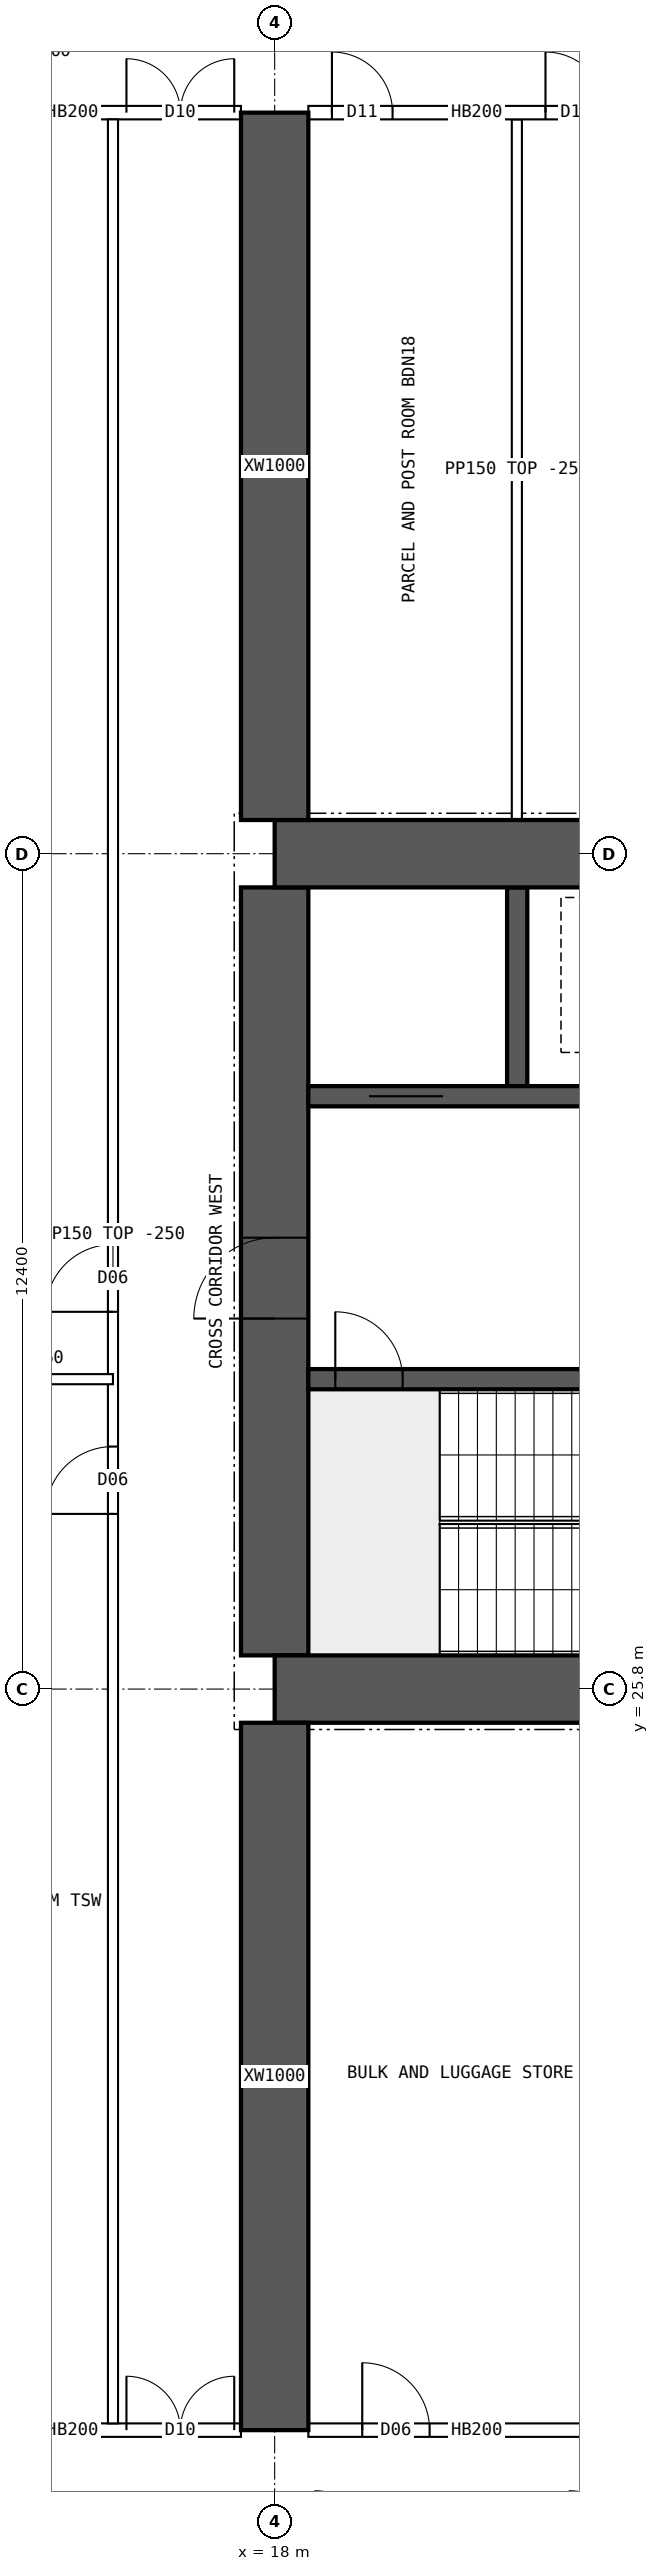
"""IFC4 building model, lengths in metres.
Left out: names, types, materials, properties, quantities, classifications, styles, units other than length and angle.
Written with IfcOpenShell. Run it as: python <this file> out.ifc"""

import sys

from ifc_helpers import new_model, si_unit, direction, frame, frame_2d, origin, place, context, subcontext, project, spatial, rectangle, extrude, element, fill, save


model = new_model("IFC4")
c1 = context("Model", 3, precision=1e-05, world=origin(), true_north=direction((0.0, 1.0)))
c2 = subcontext(c1, "Body", "Model", "MODEL_VIEW")
j1 = project(units=[si_unit("LENGTHUNIT", "METRE"), si_unit("PLANEANGLEUNIT", "RADIAN")], contexts=[c1])
p1 = place(None, origin())
s1 = spatial("IfcSite", under=j1, at=p1, CompositionType="ELEMENT")
p2 = place(p1, origin())
s2 = spatial("IfcBuilding", under=s1, at=p2, CompositionType="ELEMENT")
p3 = place(p2, frame((0.0, 0.0, 57.7)))
s3 = spatial("IfcBuildingStorey", under=s2, at=p3, CompositionType="ELEMENT", Elevation=57.7)
for number, where, z_axis, x_axis in (
    (1, (18.0, 25.8, 0.0), (0.0, 0.0, 1.0), (1.0, 0.0, 0.0)),
    (2, (18.0, 38.2, 0.0), (0.0, 0.0, 1.0), (1.0, 0.0, 0.0)),
):
    element("IfcWall", number, at=place(p3, frame(where, z_axis=z_axis, x_axis=x_axis)), inside=s3, PredefinedType="SHEAR", context=c2, shape_type="SweptSolid", body=[
        extrude(rectangle(XDim=48.0, YDim=1.0, at=frame_2d((24.0, 0.0))), origin(), (0.0, 0.0, 1.0), 3.75),
    ])
p4 = place(p3, frame((18.0, 26.3, 0.0), z_axis=(0.0, 0.0, 1.0), x_axis=(0.0, 1.0, 0.0)))
e3 = element("IfcWall", 3, at=p4, inside=s3, PredefinedType="SHEAR", context=c2, shape_type="SweptSolid", body=[
    extrude(rectangle(XDim=11.4, YDim=1.0, at=frame_2d((5.7, 0.0))), origin(), (0.0, 0.0, 1.0), 3.75),
])
p5 = place(p4, frame((5.0, 0.0, 0.0)))
e4 = element("IfcOpeningElement", 4, at=p5, cuts=e3, PredefinedType="OPENING", context=c2, shape_type="SweptSolid", body=[
    extrude(rectangle(XDim=1.2, YDim=2.1, at=frame_2d((0.6, 1.05))), frame((0.0, 0.51, 0.0), z_axis=(0.0, -1.0, 0.0), x_axis=(1.0, 0.0, 0.0)), (0.0, 0.0, 1.0), 1.02),
])
p6 = place(p3, frame((18.5, 30.4, 0.0), z_axis=(0.0, 0.0, 1.0), x_axis=(1.0, 0.0, 0.0)))
e5 = element("IfcWall", 5, at=p6, inside=s3, PredefinedType="SHEAR", context=c2, shape_type="SweptSolid", body=[
    extrude(rectangle(XDim=47.0, YDim=0.3, at=frame_2d((23.5, 0.0))), origin(), (0.0, 0.0, 1.0), 3.75),
])
p7 = place(p6, frame((0.4, 0.0, 0.0)))
e6 = element("IfcOpeningElement", 6, at=p7, cuts=e5, PredefinedType="OPENING", context=c2, shape_type="SweptSolid", body=[
    extrude(rectangle(XDim=1.0, YDim=2.1, at=frame_2d((0.5, 1.05))), frame((0.0, 0.16, 0.0), z_axis=(0.0, -1.0, 0.0), x_axis=(1.0, 0.0, 0.0)), (0.0, 0.0, 1.0), 0.32),
])
p8 = place(p6, frame((45.6, 0.0, 0.0)))
e7 = element("IfcOpeningElement", 7, at=p8, cuts=e5, PredefinedType="OPENING", context=c2, shape_type="SweptSolid", body=[
    extrude(rectangle(XDim=1.0, YDim=2.1, at=frame_2d((0.5, 1.05))), frame((0.0, 0.16, 0.0), z_axis=(0.0, -1.0, 0.0), x_axis=(1.0, 0.0, 0.0)), (0.0, 0.0, 1.0), 0.32),
])
p9 = place(p6, frame((8.25, 0.0, 0.0)))
e8 = element("IfcOpeningElement", 8, at=p9, cuts=e5, PredefinedType="OPENING", context=c2, shape_type="SweptSolid", body=[
    extrude(rectangle(XDim=1.1, YDim=2.1, at=frame_2d((0.55, 1.05))), frame((0.0, 0.16, 0.0), z_axis=(0.0, -1.0, 0.0), x_axis=(1.0, 0.0, 0.0)), (0.0, 0.0, 1.0), 0.32),
])
p10 = place(p6, frame((10.85, 0.0, 0.0)))
e9 = element("IfcOpeningElement", 9, at=p10, cuts=e5, PredefinedType="OPENING", context=c2, shape_type="SweptSolid", body=[
    extrude(rectangle(XDim=1.1, YDim=2.1, at=frame_2d((0.55, 1.05))), frame((0.0, 0.16, 0.0), z_axis=(0.0, -1.0, 0.0), x_axis=(1.0, 0.0, 0.0)), (0.0, 0.0, 1.0), 0.32),
])
p11 = place(p6, frame((13.45, 0.0, 0.0)))
e10 = element("IfcOpeningElement", 10, at=p11, cuts=e5, PredefinedType="OPENING", context=c2, shape_type="SweptSolid", body=[
    extrude(rectangle(XDim=1.1, YDim=2.1, at=frame_2d((0.55, 1.05))), frame((0.0, 0.16, 0.0), z_axis=(0.0, -1.0, 0.0), x_axis=(1.0, 0.0, 0.0)), (0.0, 0.0, 1.0), 0.32),
])
p12 = place(p6, frame((16.05, 0.0, 0.0)))
e11 = element("IfcOpeningElement", 11, at=p12, cuts=e5, PredefinedType="OPENING", context=c2, shape_type="SweptSolid", body=[
    extrude(rectangle(XDim=1.1, YDim=2.1, at=frame_2d((0.55, 1.05))), frame((0.0, 0.16, 0.0), z_axis=(0.0, -1.0, 0.0), x_axis=(1.0, 0.0, 0.0)), (0.0, 0.0, 1.0), 0.32),
])
p13 = place(p6, frame((30.117, 0.0, 0.0)))
e12 = element("IfcOpeningElement", 12, at=p13, cuts=e5, PredefinedType="OPENING", context=c2, shape_type="SweptSolid", body=[
    extrude(rectangle(XDim=1.1, YDim=2.1, at=frame_2d((0.55, 1.05))), frame((0.0, 0.16, 0.0), z_axis=(0.0, -1.0, 0.0), x_axis=(1.0, 0.0, 0.0)), (0.0, 0.0, 1.0), 0.32),
])
p14 = place(p6, frame((33.65, 0.0, 0.0)))
e13 = element("IfcOpeningElement", 13, at=p14, cuts=e5, PredefinedType="OPENING", context=c2, shape_type="SweptSolid", body=[
    extrude(rectangle(XDim=1.1, YDim=2.1, at=frame_2d((0.55, 1.05))), frame((0.0, 0.16, 0.0), z_axis=(0.0, -1.0, 0.0), x_axis=(1.0, 0.0, 0.0)), (0.0, 0.0, 1.0), 0.32),
])
p15 = place(p6, frame((37.183, 0.0, 0.0)))
e14 = element("IfcOpeningElement", 14, at=p15, cuts=e5, PredefinedType="OPENING", context=c2, shape_type="SweptSolid", body=[
    extrude(rectangle(XDim=1.1, YDim=2.1, at=frame_2d((0.55, 1.05))), frame((0.0, 0.16, 0.0), z_axis=(0.0, -1.0, 0.0), x_axis=(1.0, 0.0, 0.0)), (0.0, 0.0, 1.0), 0.32),
])
p16 = place(p3, frame((18.5, 34.6, 0.0), z_axis=(0.0, 0.0, 1.0), x_axis=(1.0, 0.0, 0.0)))
e15 = element("IfcWall", 15, at=p16, inside=s3, PredefinedType="SHEAR", context=c2, shape_type="SweptSolid", body=[
    extrude(rectangle(XDim=47.0, YDim=0.3, at=frame_2d((23.5, 0.0))), origin(), (0.0, 0.0, 1.0), 3.75),
])
p17 = place(p16, frame((0.9, 0.0, 0.0)))
e16 = element("IfcOpeningElement", 16, at=p17, cuts=e15, PredefinedType="OPENING", context=c2, shape_type="SweptSolid", body=[
    extrude(rectangle(XDim=1.1, YDim=2.1, at=frame_2d((0.55, 1.05))), frame((0.0, 0.16, 0.0), z_axis=(0.0, -1.0, 0.0), x_axis=(1.0, 0.0, 0.0)), (0.0, 0.0, 1.0), 0.32),
])
p18 = place(p16, frame((45.0, 0.0, 0.0)))
e17 = element("IfcOpeningElement", 17, at=p18, cuts=e15, PredefinedType="OPENING", context=c2, shape_type="SweptSolid", body=[
    extrude(rectangle(XDim=1.1, YDim=2.1, at=frame_2d((0.55, 1.05))), frame((0.0, 0.16, 0.0), z_axis=(0.0, -1.0, 0.0), x_axis=(1.0, 0.0, 0.0)), (0.0, 0.0, 1.0), 0.32),
])
p19 = place(p16, frame((4.1, 0.0, 0.0)))
e18 = element("IfcOpeningElement", 18, at=p19, cuts=e15, PredefinedType="OPENING", context=c2, shape_type="SweptSolid", body=[
    extrude(rectangle(XDim=0.9, YDim=2.1, at=frame_2d((0.45, 1.05))), frame((0.0, 0.16, 0.0), z_axis=(0.0, -1.0, 0.0), x_axis=(1.0, 0.0, 0.0)), (0.0, 0.0, 1.0), 0.32),
])
p20 = place(p16, frame((42.0, 0.0, 0.0)))
e19 = element("IfcOpeningElement", 19, at=p20, cuts=e15, PredefinedType="OPENING", context=c2, shape_type="SweptSolid", body=[
    extrude(rectangle(XDim=0.9, YDim=2.1, at=frame_2d((0.45, 1.05))), frame((0.0, 0.16, 0.0), z_axis=(0.0, -1.0, 0.0), x_axis=(1.0, 0.0, 0.0)), (0.0, 0.0, 1.0), 0.32),
])
p21 = place(p16, frame((8.875, 0.0, 0.0)))
e20 = element("IfcOpeningElement", 20, at=p21, cuts=e15, PredefinedType="OPENING", context=c2, shape_type="SweptSolid", body=[
    extrude(rectangle(XDim=0.9, YDim=2.1, at=frame_2d((0.45, 1.05))), frame((0.0, 0.16, 0.0), z_axis=(0.0, -1.0, 0.0), x_axis=(1.0, 0.0, 0.0)), (0.0, 0.0, 1.0), 0.32),
])
p22 = place(p16, frame((12.849, 0.0, 0.0)))
e21 = element("IfcOpeningElement", 21, at=p22, cuts=e15, PredefinedType="OPENING", context=c2, shape_type="SweptSolid", body=[
    extrude(rectangle(XDim=0.9, YDim=2.1, at=frame_2d((0.45, 1.05))), frame((0.0, 0.16, 0.0), z_axis=(0.0, -1.0, 0.0), x_axis=(1.0, 0.0, 0.0)), (0.0, 0.0, 1.0), 0.32),
])
p23 = place(p16, frame((16.496, 0.0, 0.0)))
e22 = element("IfcOpeningElement", 22, at=p23, cuts=e15, PredefinedType="OPENING", context=c2, shape_type="SweptSolid", body=[
    extrude(rectangle(XDim=0.9, YDim=2.1, at=frame_2d((0.45, 1.05))), frame((0.0, 0.16, 0.0), z_axis=(0.0, -1.0, 0.0), x_axis=(1.0, 0.0, 0.0)), (0.0, 0.0, 1.0), 0.32),
])
p24 = place(p16, frame((20.255, 0.0, 0.0)))
e23 = element("IfcOpeningElement", 23, at=p24, cuts=e15, PredefinedType="OPENING", context=c2, shape_type="SweptSolid", body=[
    extrude(rectangle(XDim=0.9, YDim=2.1, at=frame_2d((0.45, 1.05))), frame((0.0, 0.16, 0.0), z_axis=(0.0, -1.0, 0.0), x_axis=(1.0, 0.0, 0.0)), (0.0, 0.0, 1.0), 0.32),
])
p25 = place(p16, frame((24.661, 0.0, 0.0)))
e24 = element("IfcOpeningElement", 24, at=p25, cuts=e15, PredefinedType="OPENING", context=c2, shape_type="SweptSolid", body=[
    extrude(rectangle(XDim=0.9, YDim=2.1, at=frame_2d((0.45, 1.05))), frame((0.0, 0.16, 0.0), z_axis=(0.0, -1.0, 0.0), x_axis=(1.0, 0.0, 0.0)), (0.0, 0.0, 1.0), 0.32),
])
p26 = place(p16, frame((27.458, 0.0, 0.0)))
e25 = element("IfcOpeningElement", 25, at=p26, cuts=e15, PredefinedType="OPENING", context=c2, shape_type="SweptSolid", body=[
    extrude(rectangle(XDim=0.9, YDim=2.1, at=frame_2d((0.45, 1.05))), frame((0.0, 0.16, 0.0), z_axis=(0.0, -1.0, 0.0), x_axis=(1.0, 0.0, 0.0)), (0.0, 0.0, 1.0), 0.32),
])
p27 = place(p16, frame((29.831, 0.0, 0.0)))
e26 = element("IfcOpeningElement", 26, at=p27, cuts=e15, PredefinedType="OPENING", context=c2, shape_type="SweptSolid", body=[
    extrude(rectangle(XDim=0.9, YDim=2.1, at=frame_2d((0.45, 1.05))), frame((0.0, 0.16, 0.0), z_axis=(0.0, -1.0, 0.0), x_axis=(1.0, 0.0, 0.0)), (0.0, 0.0, 1.0), 0.32),
])
p28 = place(p16, frame((35.302, 0.0, 0.0)))
e27 = element("IfcOpeningElement", 27, at=p28, cuts=e15, PredefinedType="OPENING", context=c2, shape_type="SweptSolid", body=[
    extrude(rectangle(XDim=0.9, YDim=2.1, at=frame_2d((0.45, 1.05))), frame((0.0, 0.16, 0.0), z_axis=(0.0, -1.0, 0.0), x_axis=(1.0, 0.0, 0.0)), (0.0, 0.0, 1.0), 0.32),
])
p29 = place(p3, frame((21.6, 34.75, 0.0), z_axis=(0.0, 0.0, 1.0), x_axis=(0.0, 1.0, 0.0)))
e28 = element("IfcWall", 28, at=p29, inside=s3, PredefinedType="SHEAR", context=c2, shape_type="SweptSolid", body=[
    extrude(rectangle(XDim=2.95, YDim=0.3, at=frame_2d((1.475, 0.0))), origin(), (0.0, 0.0, 1.0), 3.75),
])
for number, where, z_axis, x_axis in (
    (29, (18.0, 14.8, 0.0), (0.0, 0.0, 1.0), (0.0, 1.0, 0.0)),
    (30, (18.0, 38.7, 0.0), (0.0, 0.0, 1.0), (0.0, 1.0, 0.0)),
):
    element("IfcWall", number, at=place(p3, frame(where, z_axis=z_axis, x_axis=x_axis)), inside=s3, PredefinedType="SHEAR", context=c2, shape_type="SweptSolid", body=[
        extrude(rectangle(XDim=10.5, YDim=1.0, at=frame_2d((5.25, 0.0))), origin(), (0.0, 0.0, 1.0), 3.75),
    ])
p30 = place(p3, frame((12.5, 14.8, 0.0), z_axis=(0.0, 0.0, 1.0), x_axis=(1.0, 0.0, 0.0)))
e31 = element("IfcWall", 31, at=p30, inside=s3, PredefinedType="SOLIDWALL", context=c2, shape_type="SweptSolid", body=[
    extrude(rectangle(XDim=5.0, YDim=0.2, at=frame_2d((2.5, 0.0))), origin(), (0.0, 0.0, 1.0), 3.5),
])
p31 = place(p30, frame((3.3, 0.0, 0.0)))
e32 = element("IfcOpeningElement", 32, at=p31, cuts=e31, PredefinedType="OPENING", context=c2, shape_type="SweptSolid", body=[
    extrude(rectangle(XDim=1.6, YDim=2.1, at=frame_2d((0.8, 1.05))), frame((0.0, 0.11, 0.0), z_axis=(0.0, -1.0, 0.0), x_axis=(1.0, 0.0, 0.0)), (0.0, 0.0, 1.0), 0.22),
])
p32 = place(p3, frame((18.5, 14.8, 0.0), z_axis=(0.0, 0.0, 1.0), x_axis=(1.0, 0.0, 0.0)))
e33 = element("IfcWall", 33, at=p32, inside=s3, PredefinedType="SOLIDWALL", context=c2, shape_type="SweptSolid", body=[
    extrude(rectangle(XDim=5.0, YDim=0.2, at=frame_2d((2.5, 0.0))), origin(), (0.0, 0.0, 1.0), 3.5),
])
p33 = place(p32, frame((0.8, 0.0, 0.0)))
e34 = element("IfcOpeningElement", 34, at=p33, cuts=e33, PredefinedType="OPENING", context=c2, shape_type="SweptSolid", body=[
    extrude(rectangle(XDim=1.0, YDim=2.1, at=frame_2d((0.5, 1.05))), frame((0.0, 0.11, 0.0), z_axis=(0.0, -1.0, 0.0), x_axis=(1.0, 0.0, 0.0)), (0.0, 0.0, 1.0), 0.22),
])
p34 = place(p3, frame((12.5, 49.2, 0.0), z_axis=(0.0, 0.0, 1.0), x_axis=(1.0, 0.0, 0.0)))
e35 = element("IfcWall", 35, at=p34, inside=s3, PredefinedType="SOLIDWALL", context=c2, shape_type="SweptSolid", body=[
    extrude(rectangle(XDim=5.0, YDim=0.2, at=frame_2d((2.5, 0.0))), origin(), (0.0, 0.0, 1.0), 3.5),
])
p35 = place(p34, frame((3.3, 0.0, 0.0)))
e36 = element("IfcOpeningElement", 36, at=p35, cuts=e35, PredefinedType="OPENING", context=c2, shape_type="SweptSolid", body=[
    extrude(rectangle(XDim=1.6, YDim=2.1, at=frame_2d((0.8, 1.05))), frame((0.0, 0.11, 0.0), z_axis=(0.0, -1.0, 0.0), x_axis=(1.0, 0.0, 0.0)), (0.0, 0.0, 1.0), 0.22),
])
p36 = place(p3, frame((18.5, 49.2, 0.0), z_axis=(0.0, 0.0, 1.0), x_axis=(1.0, 0.0, 0.0)))
e37 = element("IfcWall", 37, at=p36, inside=s3, PredefinedType="SOLIDWALL", context=c2, shape_type="SweptSolid", body=[
    extrude(rectangle(XDim=5.0, YDim=0.2, at=frame_2d((2.5, 0.0))), origin(), (0.0, 0.0, 1.0), 3.5),
])
p37 = place(p36, frame((0.35, 0.0, 0.0)))
e38 = element("IfcOpeningElement", 38, at=p37, cuts=e37, PredefinedType="OPENING", context=c2, shape_type="SweptSolid", body=[
    extrude(rectangle(XDim=0.9, YDim=2.1, at=frame_2d((0.45, 1.05))), frame((0.0, 0.11, 0.0), z_axis=(0.0, -1.0, 0.0), x_axis=(1.0, 0.0, 0.0)), (0.0, 0.0, 1.0), 0.22),
])
p38 = place(p36, frame((3.52, 0.0, 0.0)))
e39 = element("IfcOpeningElement", 39, at=p38, cuts=e37, PredefinedType="OPENING", context=c2, shape_type="SweptSolid", body=[
    extrude(rectangle(XDim=0.9, YDim=2.1, at=frame_2d((0.45, 1.05))), frame((0.0, 0.11, 0.0), z_axis=(0.0, -1.0, 0.0), x_axis=(1.0, 0.0, 0.0)), (0.0, 0.0, 1.0), 0.22),
])
p39 = place(p3, frame((21.595, 38.7, 0.0), z_axis=(0.0, 0.0, 1.0), x_axis=(0.0, 1.0, 0.0)))
e40 = element("IfcWall", 40, at=p39, inside=s3, PredefinedType="PARTITIONING", context=c2, shape_type="SweptSolid", body=[
    extrude(rectangle(XDim=10.4, YDim=0.15, at=frame_2d((5.2, 0.0))), origin(), (0.0, 0.0, 1.0), 3.5),
])
p40 = place(p3, frame((15.6, 14.9, 0.0), z_axis=(0.0, 0.0, 1.0), x_axis=(0.0, 1.0, 0.0)))
e41 = element("IfcWall", 41, at=p40, inside=s3, PredefinedType="PARTITIONING", context=c2, shape_type="SweptSolid", body=[
    extrude(rectangle(XDim=34.2, YDim=0.15, at=frame_2d((17.1, 0.0))), origin(), (0.0, 0.0, 1.0), 3.5),
])
p41 = place(p40, frame((13.5, 0.0, 0.0)))
e42 = element("IfcOpeningElement", 42, at=p41, cuts=e41, PredefinedType="OPENING", context=c2, shape_type="SweptSolid", body=[
    extrude(rectangle(XDim=1.0, YDim=2.1, at=frame_2d((0.5, 1.05))), frame((0.0, 0.085, 0.0), z_axis=(0.0, -1.0, 0.0), x_axis=(1.0, 0.0, 0.0)), (0.0, 0.0, 1.0), 0.17),
])
p42 = place(p40, frame((16.5, 0.0, 0.0)))
e43 = element("IfcOpeningElement", 43, at=p42, cuts=e41, PredefinedType="OPENING", context=c2, shape_type="SweptSolid", body=[
    extrude(rectangle(XDim=1.0, YDim=2.1, at=frame_2d((0.5, 1.05))), frame((0.0, 0.085, 0.0), z_axis=(0.0, -1.0, 0.0), x_axis=(1.0, 0.0, 0.0)), (0.0, 0.0, 1.0), 0.17),
])
p43 = place(p3, frame((12.0, 30.4, 0.0), z_axis=(0.0, 0.0, 1.0), x_axis=(1.0, 0.0, 0.0)))
e44 = element("IfcWall", 44, at=p43, inside=s3, PredefinedType="PARTITIONING", context=c2, shape_type="SweptSolid", body=[
    extrude(rectangle(XDim=3.6, YDim=0.15, at=frame_2d((1.8, 0.0))), origin(), (0.0, 0.0, 1.0), 3.5),
])
p44 = place(p5, origin())
e45 = element("IfcDoor", 45, at=p44, inside=s3, OperationType="SINGLE_SWING_LEFT", PredefinedType="DOOR", context=c2, shape_type="SweptSolid", body=[
    extrude(rectangle(XDim=1.2, YDim=2.1, at=frame_2d((0.6, 1.05))), frame((0.0, 0.025, 0.0), z_axis=(0.0, -1.0, 0.0), x_axis=(1.0, 0.0, 0.0)), (0.0, 0.0, 1.0), 0.05),
])
fill(e4, e45)
p45 = place(p7, origin())
e46 = element("IfcDoor", 46, at=p45, inside=s3, OperationType="SINGLE_SWING_LEFT", PredefinedType="DOOR", context=c2, shape_type="SweptSolid", body=[
    extrude(rectangle(XDim=1.0, YDim=2.1, at=frame_2d((0.5, 1.05))), frame((0.0, 0.025, 0.0), z_axis=(0.0, -1.0, 0.0), x_axis=(1.0, 0.0, 0.0)), (0.0, 0.0, 1.0), 0.05),
])
fill(e6, e46)
p46 = place(p17, origin())
e47 = element("IfcDoor", 47, at=p46, inside=s3, OperationType="DOUBLE_DOOR_SLIDING", PredefinedType="DOOR", context=c2, shape_type="SweptSolid", body=[
    extrude(rectangle(XDim=1.1, YDim=2.1, at=frame_2d((0.55, 1.05))), frame((0.0, 0.025, 0.0), z_axis=(0.0, -1.0, 0.0), x_axis=(1.0, 0.0, 0.0)), (0.0, 0.0, 1.0), 0.05),
])
fill(e16, e47)
p47 = place(p31, origin())
e48 = element("IfcDoor", 48, at=p47, inside=s3, OperationType="DOUBLE_DOOR_SINGLE_SWING", PredefinedType="DOOR", context=c2, shape_type="SweptSolid", body=[
    extrude(rectangle(XDim=1.6, YDim=2.1, at=frame_2d((0.8, 1.05))), frame((0.0, 0.025, 0.0), z_axis=(0.0, -1.0, 0.0), x_axis=(1.0, 0.0, 0.0)), (0.0, 0.0, 1.0), 0.05),
])
fill(e32, e48)
p48 = place(p35, origin())
e49 = element("IfcDoor", 49, at=p48, inside=s3, OperationType="DOUBLE_DOOR_SINGLE_SWING", PredefinedType="DOOR", context=c2, shape_type="SweptSolid", body=[
    extrude(rectangle(XDim=1.6, YDim=2.1, at=frame_2d((0.8, 1.05))), frame((0.0, 0.025, 0.0), z_axis=(0.0, -1.0, 0.0), x_axis=(1.0, 0.0, 0.0)), (0.0, 0.0, 1.0), 0.05),
])
fill(e36, e49)
p49 = place(p33, origin())
e50 = element("IfcDoor", 50, at=p49, inside=s3, OperationType="SINGLE_SWING_LEFT", PredefinedType="DOOR", context=c2, shape_type="SweptSolid", body=[
    extrude(rectangle(XDim=1.0, YDim=2.1, at=frame_2d((0.5, 1.05))), frame((0.0, 0.025, 0.0), z_axis=(0.0, -1.0, 0.0), x_axis=(1.0, 0.0, 0.0)), (0.0, 0.0, 1.0), 0.05),
])
fill(e34, e50)
p50 = place(p37, origin())
e51 = element("IfcDoor", 51, at=p50, inside=s3, OperationType="SINGLE_SWING_LEFT", PredefinedType="DOOR", context=c2, shape_type="SweptSolid", body=[
    extrude(rectangle(XDim=0.9, YDim=2.1, at=frame_2d((0.45, 1.05))), frame((0.0, 0.025, 0.0), z_axis=(0.0, -1.0, 0.0), x_axis=(1.0, 0.0, 0.0)), (0.0, 0.0, 1.0), 0.05),
])
fill(e38, e51)
p51 = place(p38, origin())
e52 = element("IfcDoor", 52, at=p51, inside=s3, OperationType="SINGLE_SWING_LEFT", PredefinedType="DOOR", context=c2, shape_type="SweptSolid", body=[
    extrude(rectangle(XDim=0.9, YDim=2.1, at=frame_2d((0.45, 1.05))), frame((0.0, 0.025, 0.0), z_axis=(0.0, -1.0, 0.0), x_axis=(1.0, 0.0, 0.0)), (0.0, 0.0, 1.0), 0.05),
])
fill(e39, e52)
p52 = place(p41, origin())
e53 = element("IfcDoor", 53, at=p52, inside=s3, OperationType="SINGLE_SWING_LEFT", PredefinedType="DOOR", context=c2, shape_type="SweptSolid", body=[
    extrude(rectangle(XDim=1.0, YDim=2.1, at=frame_2d((0.5, 1.05))), frame((0.0, 0.025, 0.0), z_axis=(0.0, -1.0, 0.0), x_axis=(1.0, 0.0, 0.0)), (0.0, 0.0, 1.0), 0.05),
])
fill(e42, e53)
p53 = place(p42, origin())
e54 = element("IfcDoor", 54, at=p53, inside=s3, OperationType="SINGLE_SWING_LEFT", PredefinedType="DOOR", context=c2, shape_type="SweptSolid", body=[
    extrude(rectangle(XDim=1.0, YDim=2.1, at=frame_2d((0.5, 1.05))), frame((0.0, 0.025, 0.0), z_axis=(0.0, -1.0, 0.0), x_axis=(1.0, 0.0, 0.0)), (0.0, 0.0, 1.0), 0.05),
])
fill(e43, e54)
save(model, sys.argv[1])
